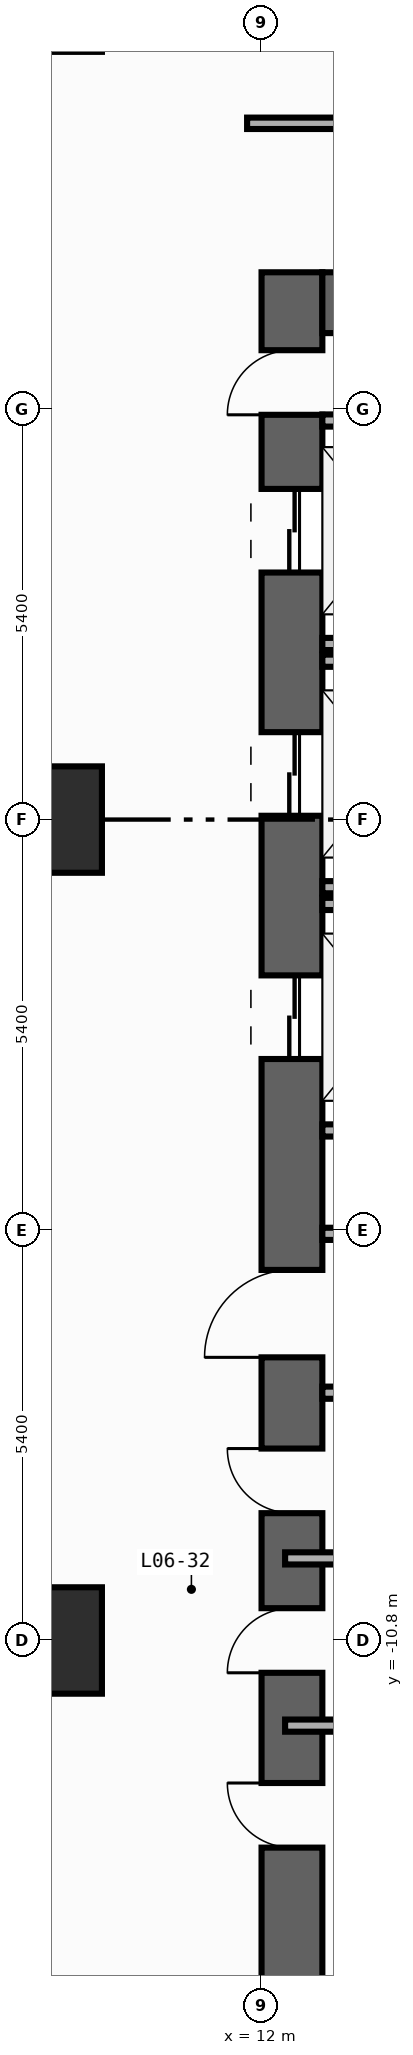
"""IFC4 building model, lengths in metres.
Left out: names, types, materials, properties, quantities, classifications, styles, units other than length and angle.
Written with IfcOpenShell. Run it as: python <this file> out.ifc"""

import sys

from ifc_helpers import new_model, si_unit, direction, frame, frame_2d, origin, origin_2d, place, context, subcontext, project, spatial, rectangle, extrude, element, fill, save


model = new_model("IFC4")
c1 = context("Model", 3, precision=1e-05, world=origin(), true_north=direction((0.0, 1.0)))
c2 = subcontext(c1, "Body", "Model", "MODEL_VIEW")
j1 = project(units=[si_unit("LENGTHUNIT", "METRE"), si_unit("PLANEANGLEUNIT", "RADIAN")], contexts=[c1])
p1 = place(None, origin())
s1 = spatial("IfcSite", under=j1, at=p1, CompositionType="ELEMENT")
p2 = place(p1, origin())
s2 = spatial("IfcBuilding", under=s1, at=p2, CompositionType="ELEMENT")
p3 = place(p2, frame((0.0, 0.0, 26.0)))
s3 = spatial("IfcBuildingStorey", under=s2, at=p3, CompositionType="ELEMENT", Elevation=26.0)
p4 = place(p3, frame((12.4, -19.8, 0.0), z_axis=(0.0, 0.0, 1.0), x_axis=(0.0, 1.0, 0.0)))
e1 = element("IfcWall", 1, at=p4, inside=s3, PredefinedType="SHEAR", context=c2, shape_type="SweptSolid", body=[
    extrude(rectangle(XDim=27.0, YDim=0.8, at=frame_2d((13.5, 0.0))), origin(), (0.0, 0.0, 1.0), 3.94),
])
p5 = place(p4, frame((23.05, 0.0, 0.0)))
e2 = element("IfcOpeningElement", 2, at=p5, cuts=e1, PredefinedType="OPENING", context=c2, shape_type="SweptSolid", body=[
    extrude(rectangle(XDim=1.1, YDim=2.2, at=frame_2d((0.55, 1.1))), frame((0.0, 0.41, 0.0), z_axis=(0.0, -1.0, 0.0), x_axis=(1.0, 0.0, 0.0)), (0.0, 0.0, 1.0), 0.82),
])
p6 = place(p4, frame((19.85, 0.0, 0.0)))
e3 = element("IfcOpeningElement", 3, at=p6, cuts=e1, PredefinedType="OPENING", context=c2, shape_type="SweptSolid", body=[
    extrude(rectangle(XDim=1.1, YDim=2.2, at=frame_2d((0.55, 1.1))), frame((0.0, 0.41, 0.0), z_axis=(0.0, -1.0, 0.0), x_axis=(1.0, 0.0, 0.0)), (0.0, 0.0, 1.0), 0.82),
])
p7 = place(p4, frame((16.65, 0.0, 0.0)))
e4 = element("IfcOpeningElement", 4, at=p7, cuts=e1, PredefinedType="OPENING", context=c2, shape_type="SweptSolid", body=[
    extrude(rectangle(XDim=1.1, YDim=2.2, at=frame_2d((0.55, 1.1))), frame((0.0, 0.41, 0.0), z_axis=(0.0, -1.0, 0.0), x_axis=(1.0, 0.0, 0.0)), (0.0, 0.0, 1.0), 0.82),
])
p8 = place(p4, frame((6.275, 0.0, 0.0)))
e5 = element("IfcOpeningElement", 5, at=p8, cuts=e1, PredefinedType="OPENING", context=c2, shape_type="SweptSolid", body=[
    extrude(rectangle(XDim=0.85, YDim=2.1, at=frame_2d((0.425, 1.05))), frame((0.0, 0.41, 0.0), z_axis=(0.0, -1.0, 0.0), x_axis=(1.0, 0.0, 0.0)), (0.0, 0.0, 1.0), 0.82),
])
p9 = place(p4, frame((8.575, 0.0, 0.0)))
e6 = element("IfcOpeningElement", 6, at=p9, cuts=e1, PredefinedType="OPENING", context=c2, shape_type="SweptSolid", body=[
    extrude(rectangle(XDim=0.85, YDim=2.1, at=frame_2d((0.425, 1.05))), frame((0.0, 0.41, 0.0), z_axis=(0.0, -1.0, 0.0), x_axis=(1.0, 0.0, 0.0)), (0.0, 0.0, 1.0), 0.82),
])
p10 = place(p4, frame((10.675, 0.0, 0.0)))
e7 = element("IfcOpeningElement", 7, at=p10, cuts=e1, PredefinedType="OPENING", context=c2, shape_type="SweptSolid", body=[
    extrude(rectangle(XDim=0.85, YDim=2.1, at=frame_2d((0.425, 1.05))), frame((0.0, 0.41, 0.0), z_axis=(0.0, -1.0, 0.0), x_axis=(1.0, 0.0, 0.0)), (0.0, 0.0, 1.0), 0.82),
])
p11 = place(p4, frame((12.725, 0.0, 0.0)))
e8 = element("IfcOpeningElement", 8, at=p11, cuts=e1, PredefinedType="OPENING", context=c2, shape_type="SweptSolid", body=[
    extrude(rectangle(XDim=1.15, YDim=2.2, at=frame_2d((0.575, 1.1))), frame((0.0, 0.41, 0.0), z_axis=(0.0, -1.0, 0.0), x_axis=(1.0, 0.0, 0.0)), (0.0, 0.0, 1.0), 0.82),
])
p12 = place(p4, frame((25.125, 0.0, 0.0)))
e9 = element("IfcOpeningElement", 9, at=p12, cuts=e1, PredefinedType="OPENING", context=c2, shape_type="SweptSolid", body=[
    extrude(rectangle(XDim=0.85, YDim=2.1, at=frame_2d((0.425, 1.05))), frame((0.0, 0.41, 0.0), z_axis=(0.0, -1.0, 0.0), x_axis=(1.0, 0.0, 0.0)), (0.0, 0.0, 1.0), 0.82),
])
p13 = place(p3, frame((12.8, 6.8, 0.0), z_axis=(0.0, 0.0, 1.0), x_axis=(1.0, 0.0, 0.0)))
e10 = element("IfcWall", 10, at=p13, inside=s3, PredefinedType="SHEAR", context=c2, shape_type="SweptSolid", body=[
    extrude(rectangle(XDim=6.8, YDim=0.8, at=frame_2d((3.4, 0.0))), origin(), (0.0, 0.0, 1.0), 3.94),
])
for number, where, z_axis, x_axis in (
    (11, (9.2, -10.8, 0.0), (0.0, 0.0, 1.0), (1.0, 0.0, 0.0)),
    (12, (9.2, 0.0, 0.0), (0.0, 0.0, 1.0), (1.0, 0.0, 0.0)),
):
    element("IfcColumn", number, at=place(p3, frame(where, z_axis=z_axis, x_axis=x_axis)), inside=s3, PredefinedType="COLUMN", context=c2, shape_type="SweptSolid", body=[
        extrude(rectangle(XDim=1.4, YDim=1.4, at=origin_2d()), origin(), (0.0, 0.0, 1.0), 4.2),
    ])
for number, where, z_axis, x_axis in (
    (13, (12.8, 2.31, 0.0), (0.0, 0.0, 1.0), (1.0, 0.0, 0.0)),
    (14, (12.8, -0.89, 0.0), (0.0, 0.0, 1.0), (1.0, 0.0, 0.0)),
    (15, (12.8, 2.09, 0.0), (0.0, 0.0, 1.0), (1.0, 0.0, 0.0)),
    (16, (12.8, -4.09, 0.0), (0.0, 0.0, 1.0), (1.0, 0.0, 0.0)),
    (17, (12.8, -1.11, 0.0), (0.0, 0.0, 1.0), (1.0, 0.0, 0.0)),
):
    element("IfcWall", number, at=place(p3, frame(where, z_axis=z_axis, x_axis=x_axis)), inside=s3, PredefinedType="STANDARD", context=c2, shape_type="SweptSolid", body=[
        extrude(rectangle(XDim=2.19, YDim=0.16, at=frame_2d((1.095, 0.0))), origin(), (0.0, 0.0, 1.0), 3.94),
    ])
for number, where, z_axis, x_axis in (
    (18, (12.8, -5.45, 0.0), (0.0, 0.0, 1.0), (1.0, 0.0, 0.0)),
    (19, (12.8, -7.54, 0.0), (0.0, 0.0, 1.0), (1.0, 0.0, 0.0)),
    (20, (12.8, 5.25, 0.0), (0.0, 0.0, 1.0), (1.0, 0.0, 0.0)),
):
    element("IfcWall", number, at=place(p3, frame(where, z_axis=z_axis, x_axis=x_axis)), inside=s3, PredefinedType="STANDARD", context=c2, shape_type="SweptSolid", body=[
        extrude(rectangle(XDim=2.6, YDim=0.16, at=frame_2d((1.3, 0.0))), origin(), (0.0, 0.0, 1.0), 3.94),
    ])
for number, where, z_axis, x_axis in (
    (21, (12.31, -11.92, 0.0), (0.0, 0.0, 1.0), (1.0, 0.0, 0.0)),
    (22, (12.31, -9.72, 0.0), (0.0, 0.0, 1.0), (1.0, 0.0, 0.0)),
):
    element("IfcWall", number, at=place(p3, frame(where, z_axis=z_axis, x_axis=x_axis)), inside=s3, PredefinedType="PARTITIONING", context=c2, shape_type="SweptSolid", body=[
        extrude(rectangle(XDim=3.065, YDim=0.16, at=frame_2d((1.532, 0.0))), origin(), (0.0, 0.0, 1.0), 3.94),
    ])
p14 = place(p3, frame((11.81, 9.16, 0.0), z_axis=(0.0, 0.0, 1.0), x_axis=(1.0, 0.0, 0.0)))
e23 = element("IfcWall", 23, at=p14, inside=s3, PredefinedType="PARTITIONING", context=c2, shape_type="SweptSolid", body=[
    extrude(rectangle(XDim=8.83, YDim=0.15, at=frame_2d((4.415, 0.0))), origin(), (0.0, 0.0, 1.0), 3.94),
])
p15 = place(p14, frame((5.067, 0.0, 0.0)))
e24 = element("IfcOpeningElement", 24, at=p15, cuts=e23, PredefinedType="OPENING", context=c2, shape_type="SweptSolid", body=[
    extrude(rectangle(XDim=0.9, YDim=2.15, at=frame_2d((0.45, 1.075))), frame((0.0, 0.085, 0.0), z_axis=(0.0, -1.0, 0.0), x_axis=(1.0, 0.0, 0.0)), (0.0, 0.0, 1.0), 0.17),
])
p16 = place(p5, origin())
e25 = element("IfcDoor", 25, at=p16, inside=s3, OperationType="DOUBLE_DOOR_SLIDING", PredefinedType="DOOR", context=c2, shape_type="SweptSolid", body=[
    extrude(rectangle(XDim=1.1, YDim=2.2, at=frame_2d((0.55, 1.1))), frame((0.0, 0.025, 0.0), z_axis=(0.0, -1.0, 0.0), x_axis=(1.0, 0.0, 0.0)), (0.0, 0.0, 1.0), 0.05),
])
fill(e2, e25)
p17 = place(p6, origin())
e26 = element("IfcDoor", 26, at=p17, inside=s3, OperationType="DOUBLE_DOOR_SLIDING", PredefinedType="DOOR", context=c2, shape_type="SweptSolid", body=[
    extrude(rectangle(XDim=1.1, YDim=2.2, at=frame_2d((0.55, 1.1))), frame((0.0, 0.025, 0.0), z_axis=(0.0, -1.0, 0.0), x_axis=(1.0, 0.0, 0.0)), (0.0, 0.0, 1.0), 0.05),
])
fill(e3, e26)
p18 = place(p7, origin())
e27 = element("IfcDoor", 27, at=p18, inside=s3, OperationType="DOUBLE_DOOR_SLIDING", PredefinedType="DOOR", context=c2, shape_type="SweptSolid", body=[
    extrude(rectangle(XDim=1.1, YDim=2.2, at=frame_2d((0.55, 1.1))), frame((0.0, 0.025, 0.0), z_axis=(0.0, -1.0, 0.0), x_axis=(1.0, 0.0, 0.0)), (0.0, 0.0, 1.0), 0.05),
])
fill(e4, e27)
p19 = place(p8, origin())
e28 = element("IfcDoor", 28, at=p19, inside=s3, OperationType="SINGLE_SWING_RIGHT", PredefinedType="DOOR", context=c2, shape_type="SweptSolid", body=[
    extrude(rectangle(XDim=0.85, YDim=2.1, at=frame_2d((0.425, 1.05))), frame((0.0, 0.025, 0.0), z_axis=(0.0, -1.0, 0.0), x_axis=(1.0, 0.0, 0.0)), (0.0, 0.0, 1.0), 0.05),
])
fill(e5, e28)
p20 = place(p9, origin())
e29 = element("IfcDoor", 29, at=p20, inside=s3, OperationType="SINGLE_SWING_LEFT", PredefinedType="DOOR", context=c2, shape_type="SweptSolid", body=[
    extrude(rectangle(XDim=0.85, YDim=2.1, at=frame_2d((0.425, 1.05))), frame((0.0, 0.025, 0.0), z_axis=(0.0, -1.0, 0.0), x_axis=(1.0, 0.0, 0.0)), (0.0, 0.0, 1.0), 0.05),
])
fill(e6, e29)
p21 = place(p10, origin())
e30 = element("IfcDoor", 30, at=p21, inside=s3, OperationType="SINGLE_SWING_RIGHT", PredefinedType="DOOR", context=c2, shape_type="SweptSolid", body=[
    extrude(rectangle(XDim=0.85, YDim=2.1, at=frame_2d((0.425, 1.05))), frame((0.0, 0.025, 0.0), z_axis=(0.0, -1.0, 0.0), x_axis=(1.0, 0.0, 0.0)), (0.0, 0.0, 1.0), 0.05),
])
fill(e7, e30)
p22 = place(p11, origin())
e31 = element("IfcDoor", 31, at=p22, inside=s3, OperationType="SINGLE_SWING_LEFT", PredefinedType="DOOR", context=c2, shape_type="SweptSolid", body=[
    extrude(rectangle(XDim=1.15, YDim=2.2, at=frame_2d((0.575, 1.1))), frame((0.0, 0.025, 0.0), z_axis=(0.0, -1.0, 0.0), x_axis=(1.0, 0.0, 0.0)), (0.0, 0.0, 1.0), 0.05),
])
fill(e8, e31)
p23 = place(p12, origin())
e32 = element("IfcDoor", 32, at=p23, inside=s3, OperationType="SINGLE_SWING_LEFT", PredefinedType="DOOR", context=c2, shape_type="SweptSolid", body=[
    extrude(rectangle(XDim=0.85, YDim=2.1, at=frame_2d((0.425, 1.05))), frame((0.0, 0.025, 0.0), z_axis=(0.0, -1.0, 0.0), x_axis=(1.0, 0.0, 0.0)), (0.0, 0.0, 1.0), 0.05),
])
fill(e9, e32)
save(model, sys.argv[1])
